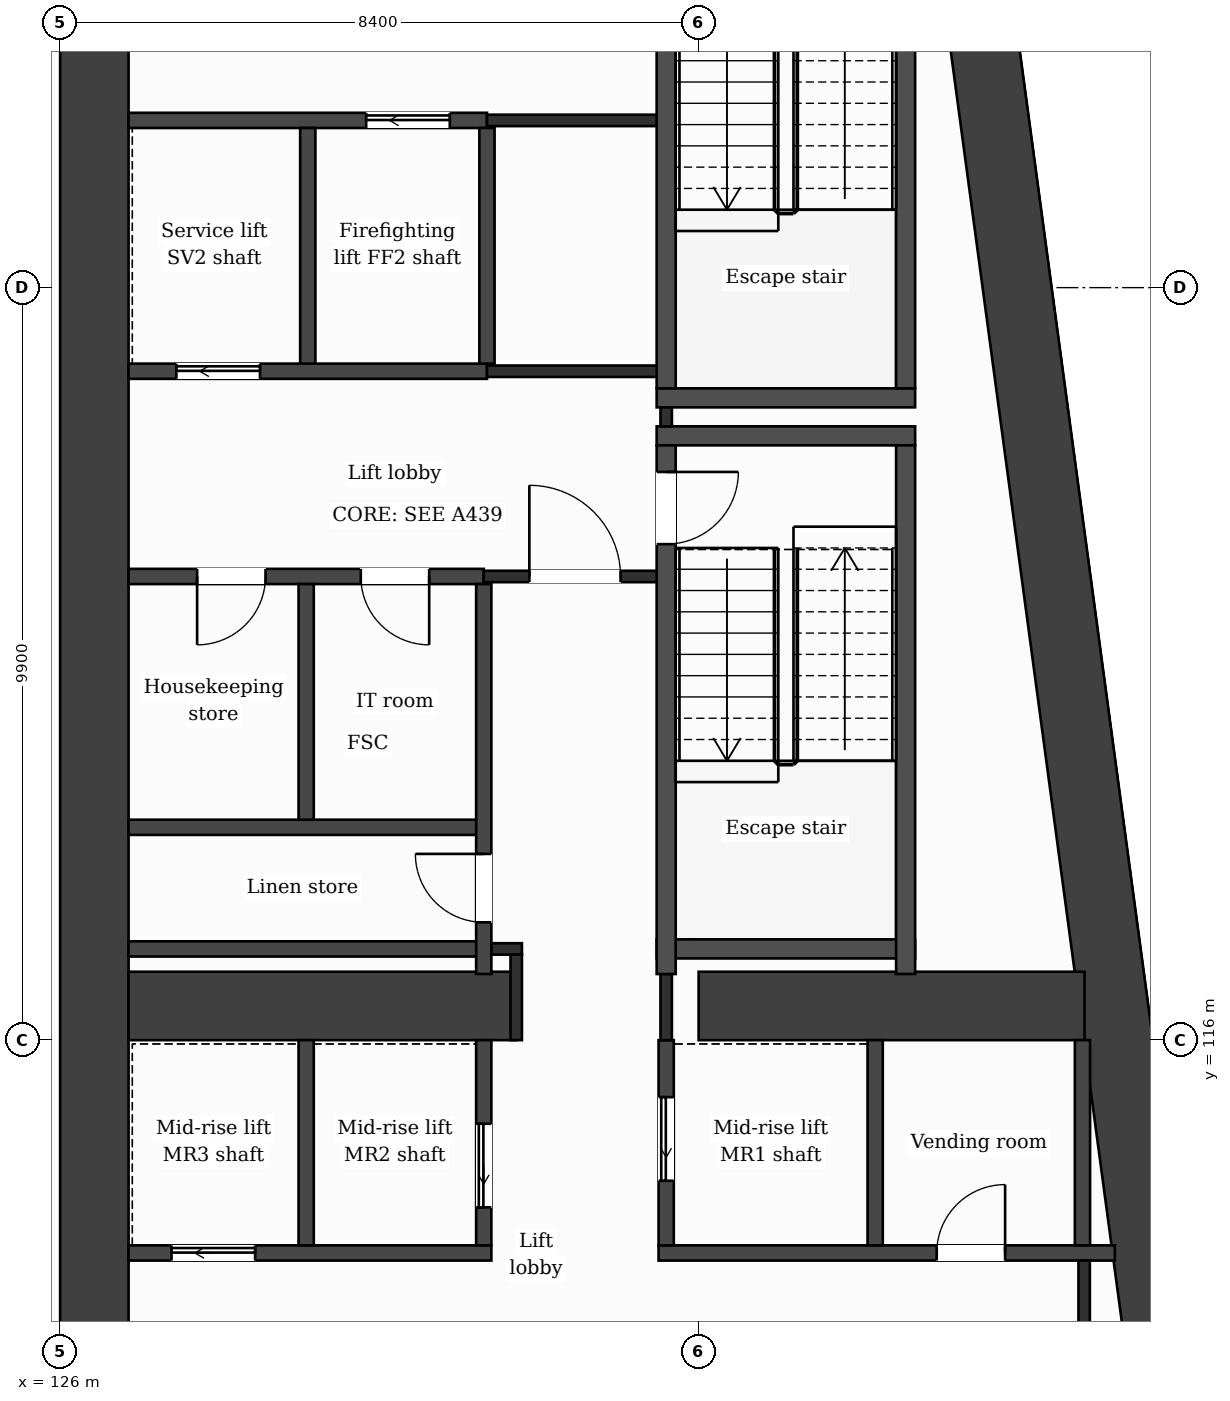
"""IFC4 building model, lengths in metres.
Left out: names, types, materials, properties, quantities, classifications, styles, units other than length and angle.
Written with IfcOpenShell. Run it as: python <this file> out.ifc"""

import sys

from ifc_helpers import new_model, si_unit, direction, frame, frame_2d, origin, place, context, subcontext, project, spatial, rectangle, extrude, element, fill, save


model = new_model("IFC4")
c1 = context("Model", 3, precision=1e-05, world=origin(), true_north=direction((0.0, 1.0)))
c2 = subcontext(c1, "Body", "Model", "MODEL_VIEW")
j1 = project(units=[si_unit("LENGTHUNIT", "METRE"), si_unit("PLANEANGLEUNIT", "RADIAN")], contexts=[c1])
p1 = place(None, origin())
s1 = spatial("IfcSite", under=j1, at=p1, CompositionType="ELEMENT")
p2 = place(p1, origin())
s2 = spatial("IfcBuilding", under=s1, at=p2, CompositionType="ELEMENT")
p3 = place(p2, frame((0.0, 0.0, 162.6)))
s3 = spatial("IfcBuildingStorey", under=s2, at=p3, CompositionType="ELEMENT", Elevation=162.6)
p4 = place(p3, frame((137.776, 131.95, 0.0), z_axis=(0.0, 0.0, 1.0), x_axis=(0.133421759112, -0.991059349482, 0.0)))
e1 = element("IfcWall", 1, at=p4, inside=s3, PredefinedType="SHEAR", context=c2, shape_type="SweptSolid", body=[
    extrude(rectangle(XDim=21.29, YDim=0.9, at=frame_2d((10.645, 0.0))), origin(), (0.0, 0.0, 1.0), 3.7),
])
p5 = place(p3, frame((126.45, 110.85, 0.0), z_axis=(0.0, 0.0, 1.0), x_axis=(0.0, 1.0, 0.0)))
e2 = element("IfcWall", 2, at=p5, inside=s3, PredefinedType="SHEAR", context=c2, shape_type="SweptSolid", body=[
    extrude(rectangle(XDim=21.1, YDim=0.9, at=frame_2d((10.55, 0.0))), origin(), (0.0, 0.0, 1.0), 3.7),
])
p6 = place(p3, frame((126.9, 116.45, 0.0), z_axis=(0.0, 0.0, 1.0), x_axis=(1.0, 0.0, 0.0)))
e3 = element("IfcWall", 3, at=p6, inside=s3, PredefinedType="SHEAR", context=c2, shape_type="SweptSolid", body=[
    extrude(rectangle(XDim=5.1, YDim=0.9, at=frame_2d((2.55, 0.0))), origin(), (0.0, 0.0, 1.0), 3.7),
])
p7 = place(p3, frame((134.4, 116.45, 0.0), z_axis=(0.0, 0.0, 1.0), x_axis=(1.0, 0.0, 0.0)))
e4 = element("IfcWall", 4, at=p7, inside=s3, PredefinedType="SHEAR", context=c2, shape_type="SweptSolid", body=[
    extrude(rectangle(XDim=5.077, YDim=0.9, at=frame_2d((2.539, 0.0))), origin(), (0.0, 0.0, 1.0), 3.7),
])
p8 = place(p3, frame((126.9, 113.2, 0.0), z_axis=(0.0, 0.0, 1.0), x_axis=(1.0, 0.0, 0.0)))
e5 = element("IfcWall", 5, at=p8, inside=s3, PredefinedType="PARTITIONING", context=c2, shape_type="SweptSolid", body=[
    extrude(rectangle(XDim=4.773, YDim=0.2, at=frame_2d((2.387, 0.0))), origin(), (0.0, 0.0, 1.0), 3.38),
])
p9 = place(p8, frame((0.565, 0.0, 0.0)))
e6 = element("IfcOpeningElement", 6, at=p9, cuts=e5, PredefinedType="OPENING", context=c2, shape_type="SweptSolid", body=[
    extrude(rectangle(XDim=1.1, YDim=2.1, at=frame_2d((0.55, 1.05))), frame((0.0, 0.11, 0.0), z_axis=(0.0, -1.0, 0.0), x_axis=(1.0, 0.0, 0.0)), (0.0, 0.0, 1.0), 0.22),
])
p10 = place(p3, frame((133.873, 113.2, 0.0), z_axis=(0.0, 0.0, 1.0), x_axis=(1.0, 0.0, 0.0)))
e7 = element("IfcWall", 7, at=p10, inside=s3, PredefinedType="PARTITIONING", context=c2, shape_type="SweptSolid", body=[
    extrude(rectangle(XDim=6.003, YDim=0.2, at=frame_2d((3.001, 0.0))), origin(), (0.0, 0.0, 1.0), 3.38),
])
p11 = place(p10, frame((3.659, 0.0, 0.0)))
e8 = element("IfcOpeningElement", 8, at=p11, cuts=e7, PredefinedType="OPENING", context=c2, shape_type="SweptSolid", body=[
    extrude(rectangle(XDim=0.9, YDim=2.1, at=frame_2d((0.45, 1.05))), frame((0.0, 0.11, 0.0), z_axis=(0.0, -1.0, 0.0), x_axis=(1.0, 0.0, 0.0)), (0.0, 0.0, 1.0), 0.22),
])
p12 = place(p3, frame((126.9, 117.2, 0.0), z_axis=(0.0, 0.0, 1.0), x_axis=(1.0, 0.0, 0.0)))
e9 = element("IfcWall", 9, at=p12, inside=s3, PredefinedType="PARTITIONING", context=c2, shape_type="SweptSolid", body=[
    extrude(rectangle(XDim=4.673, YDim=0.2, at=frame_2d((2.336, 0.0))), origin(), (0.0, 0.0, 1.0), 3.38),
])
p13 = place(p3, frame((131.573, 117.2, 0.0), z_axis=(0.0, 0.0, 1.0), x_axis=(1.0, 0.0, 0.0)))
e10 = element("IfcWall", 10, at=p13, inside=s3, PredefinedType="PARTITIONING", context=c2, shape_type="SweptSolid", body=[
    extrude(rectangle(XDim=0.502, YDim=0.15, at=frame_2d((0.251, 0.0))), origin(), (0.0, 0.0, 1.0), 3.38),
])
p14 = place(p3, frame((133.848, 117.2, 0.0), z_axis=(0.0, 0.0, 1.0), x_axis=(1.0, 0.0, 0.0)))
e11 = element("IfcWall", 11, at=p14, inside=s3, PredefinedType="PARTITIONING", context=c2, shape_type="SweptSolid", body=[
    extrude(rectangle(XDim=3.4, YDim=0.25, at=frame_2d((1.7, 0.0))), origin(), (0.0, 0.0, 1.0), 3.38),
])
p15 = place(p3, frame((126.9, 118.8, 0.0), z_axis=(0.0, 0.0, 1.0), x_axis=(1.0, 0.0, 0.0)))
e12 = element("IfcWall", 12, at=p15, inside=s3, PredefinedType="PARTITIONING", context=c2, shape_type="SweptSolid", body=[
    extrude(rectangle(XDim=4.673, YDim=0.2, at=frame_2d((2.336, 0.0))), origin(), (0.0, 0.0, 1.0), 3.38),
])
p16 = place(p3, frame((126.9, 122.1, 0.0), z_axis=(0.0, 0.0, 1.0), x_axis=(1.0, 0.0, 0.0)))
e13 = element("IfcWall", 13, at=p16, inside=s3, PredefinedType="PARTITIONING", context=c2, shape_type="SweptSolid", body=[
    extrude(rectangle(XDim=4.673, YDim=0.2, at=frame_2d((2.336, 0.0))), origin(), (0.0, 0.0, 1.0), 3.38),
])
p17 = place(p16, frame((3.055, 0.0, 0.0)))
e14 = element("IfcOpeningElement", 14, at=p17, cuts=e13, PredefinedType="OPENING", context=c2, shape_type="SweptSolid", body=[
    extrude(rectangle(XDim=0.9, YDim=2.1, at=frame_2d((0.45, 1.05))), frame((0.0, 0.11, 0.0), z_axis=(0.0, -1.0, 0.0), x_axis=(1.0, 0.0, 0.0)), (0.0, 0.0, 1.0), 0.22),
])
p18 = place(p16, frame((0.902, 0.0, 0.0)))
e15 = element("IfcOpeningElement", 15, at=p18, cuts=e13, PredefinedType="OPENING", context=c2, shape_type="SweptSolid", body=[
    extrude(rectangle(XDim=0.9, YDim=2.1, at=frame_2d((0.45, 1.05))), frame((0.0, 0.11, 0.0), z_axis=(0.0, -1.0, 0.0), x_axis=(1.0, 0.0, 0.0)), (0.0, 0.0, 1.0), 0.22),
])
p19 = place(p3, frame((131.573, 122.1, 0.0), z_axis=(0.0, 0.0, 1.0), x_axis=(1.0, 0.0, 0.0)))
e16 = element("IfcWall", 16, at=p19, inside=s3, PredefinedType="PARTITIONING", context=c2, shape_type="SweptSolid", body=[
    extrude(rectangle(XDim=2.4, YDim=0.15, at=frame_2d((1.2, 0.0))), origin(), (0.0, 0.0, 1.0), 3.38),
])
p20 = place(p19, frame((0.6, 0.0, 0.0)))
e17 = element("IfcOpeningElement", 17, at=p20, cuts=e16, PredefinedType="OPENING", context=c2, shape_type="SweptSolid", body=[
    extrude(rectangle(XDim=1.2, YDim=2.1, at=frame_2d((0.6, 1.05))), frame((0.0, 0.085, 0.0), z_axis=(0.0, -1.0, 0.0), x_axis=(1.0, 0.0, 0.0)), (0.0, 0.0, 1.0), 0.17),
])
for number, where, z_axis, x_axis in (
    (18, (133.848, 123.95, 0.0), (0.0, 0.0, 1.0), (1.0, 0.0, 0.0)),
    (19, (133.848, 124.45, 0.0), (0.0, 0.0, 1.0), (1.0, 0.0, 0.0)),
):
    element("IfcWall", number, at=place(p3, frame(where, z_axis=z_axis, x_axis=x_axis)), inside=s3, PredefinedType="PARTITIONING", context=c2, shape_type="SweptSolid", body=[
        extrude(rectangle(XDim=3.4, YDim=0.25, at=frame_2d((1.7, 0.0))), origin(), (0.0, 0.0, 1.0), 3.38),
    ])
p21 = place(p3, frame((126.9, 124.8, 0.0), z_axis=(0.0, 0.0, 1.0), x_axis=(1.0, 0.0, 0.0)))
e20 = element("IfcWall", 20, at=p21, inside=s3, PredefinedType="PARTITIONING", context=c2, shape_type="SweptSolid", body=[
    extrude(rectangle(XDim=4.715, YDim=0.2, at=frame_2d((2.358, 0.0))), origin(), (0.0, 0.0, 1.0), 3.38),
])
p22 = place(p21, frame((0.629, 0.0, 0.0)))
e21 = element("IfcOpeningElement", 21, at=p22, cuts=e20, PredefinedType="OPENING", context=c2, shape_type="SweptSolid", body=[
    extrude(rectangle(XDim=1.1, YDim=2.1, at=frame_2d((0.55, 1.05))), frame((0.0, 0.11, 0.0), z_axis=(0.0, -1.0, 0.0), x_axis=(1.0, 0.0, 0.0)), (0.0, 0.0, 1.0), 0.22),
])
p23 = place(p3, frame((131.615, 124.8, 0.0), z_axis=(0.0, 0.0, 1.0), x_axis=(1.0, 0.0, 0.0)))
e22 = element("IfcWall", 22, at=p23, inside=s3, PredefinedType="PARTITIONING", context=c2, shape_type="SweptSolid", body=[
    extrude(rectangle(XDim=2.483, YDim=0.15, at=frame_2d((1.241, 0.0))), origin(), (0.0, 0.0, 1.0), 3.38),
])
p24 = place(p3, frame((126.9, 128.1, 0.0), z_axis=(0.0, 0.0, 1.0), x_axis=(1.0, 0.0, 0.0)))
e23 = element("IfcWall", 23, at=p24, inside=s3, PredefinedType="PARTITIONING", context=c2, shape_type="SweptSolid", body=[
    extrude(rectangle(XDim=4.715, YDim=0.2, at=frame_2d((2.358, 0.0))), origin(), (0.0, 0.0, 1.0), 3.38),
])
p25 = place(p24, frame((3.126, 0.0, 0.0)))
e24 = element("IfcOpeningElement", 24, at=p25, cuts=e23, PredefinedType="OPENING", context=c2, shape_type="SweptSolid", body=[
    extrude(rectangle(XDim=1.1, YDim=2.1, at=frame_2d((0.55, 1.05))), frame((0.0, 0.11, 0.0), z_axis=(0.0, -1.0, 0.0), x_axis=(1.0, 0.0, 0.0)), (0.0, 0.0, 1.0), 0.22),
])
p26 = place(p3, frame((131.615, 128.1, 0.0), z_axis=(0.0, 0.0, 1.0), x_axis=(1.0, 0.0, 0.0)))
e25 = element("IfcWall", 25, at=p26, inside=s3, PredefinedType="PARTITIONING", context=c2, shape_type="SweptSolid", body=[
    extrude(rectangle(XDim=2.358, YDim=0.15, at=frame_2d((1.179, 0.0))), origin(), (0.0, 0.0, 1.0), 3.38),
])
p27 = place(p3, frame((129.237, 113.3, 0.0), z_axis=(0.0, 0.0, 1.0), x_axis=(0.0, 1.0, 0.0)))
e26 = element("IfcWall", 26, at=p27, inside=s3, PredefinedType="PARTITIONING", context=c2, shape_type="SweptSolid", body=[
    extrude(rectangle(XDim=2.7, YDim=0.2, at=frame_2d((1.35, 0.0))), origin(), (0.0, 0.0, 1.0), 3.38),
])
for number, where, z_axis, x_axis in (
    (27, (129.237, 118.9, 0.0), (0.0, 0.0, 1.0), (0.0, 1.0, 0.0)),
    (28, (129.258, 124.9, 0.0), (0.0, 0.0, 1.0), (0.0, 1.0, 0.0)),
):
    element("IfcWall", number, at=place(p3, frame(where, z_axis=z_axis, x_axis=x_axis)), inside=s3, PredefinedType="PARTITIONING", context=c2, shape_type="SweptSolid", body=[
        extrude(rectangle(XDim=3.1, YDim=0.2, at=frame_2d((1.55, 0.0))), origin(), (0.0, 0.0, 1.0), 3.38),
    ])
p28 = place(p3, frame((131.573, 113.3, 0.0), z_axis=(0.0, 0.0, 1.0), x_axis=(0.0, 1.0, 0.0)))
e29 = element("IfcWall", 29, at=p28, inside=s3, PredefinedType="PARTITIONING", context=c2, shape_type="SweptSolid", body=[
    extrude(rectangle(XDim=2.7, YDim=0.2, at=frame_2d((1.35, 0.0))), origin(), (0.0, 0.0, 1.0), 3.38),
])
p29 = place(p28, frame((0.5, 0.0, 0.0)))
e30 = element("IfcOpeningElement", 30, at=p29, cuts=e29, PredefinedType="OPENING", context=c2, shape_type="SweptSolid", body=[
    extrude(rectangle(XDim=1.1, YDim=2.1, at=frame_2d((0.55, 1.05))), frame((0.0, 0.11, 0.0), z_axis=(0.0, -1.0, 0.0), x_axis=(1.0, 0.0, 0.0)), (0.0, 0.0, 1.0), 0.22),
])
p30 = place(p3, frame((131.573, 116.87, 0.0), z_axis=(0.0, 0.0, 1.0), x_axis=(0.0, 1.0, 0.0)))
e31 = element("IfcWall", 31, at=p30, inside=s3, PredefinedType="PARTITIONING", context=c2, shape_type="SweptSolid", body=[
    extrude(rectangle(XDim=5.13, YDim=0.2, at=frame_2d((2.565, 0.0))), origin(), (0.0, 0.0, 1.0), 3.38),
])
p31 = place(p30, frame((0.68, 0.0, 0.0)))
e32 = element("IfcOpeningElement", 32, at=p31, cuts=e31, PredefinedType="OPENING", context=c2, shape_type="SweptSolid", body=[
    extrude(rectangle(XDim=0.9, YDim=2.1, at=frame_2d((0.45, 1.05))), frame((0.0, 0.11, 0.0), z_axis=(0.0, -1.0, 0.0), x_axis=(1.0, 0.0, 0.0)), (0.0, 0.0, 1.0), 0.22),
])
p32 = place(p3, frame((131.615, 124.9, 0.0), z_axis=(0.0, 0.0, 1.0), x_axis=(0.0, 1.0, 0.0)))
e33 = element("IfcWall", 33, at=p32, inside=s3, PredefinedType="PARTITIONING", context=c2, shape_type="SweptSolid", body=[
    extrude(rectangle(XDim=3.1, YDim=0.2, at=frame_2d((1.55, 0.0))), origin(), (0.0, 0.0, 1.0), 3.38),
])
p33 = place(p3, frame((132.0, 116.0, 0.0), z_axis=(0.0, 0.0, 1.0), x_axis=(0.0, 1.0, 0.0)))
e34 = element("IfcWall", 34, at=p33, inside=s3, PredefinedType="PARTITIONING", context=c2, shape_type="SweptSolid", body=[
    extrude(rectangle(XDim=1.125, YDim=0.15, at=frame_2d((0.562, 0.0))), origin(), (0.0, 0.0, 1.0), 3.38),
])
p34 = place(p3, frame((133.973, 113.3, 0.0), z_axis=(0.0, 0.0, 1.0), x_axis=(0.0, 1.0, 0.0)))
e35 = element("IfcWall", 35, at=p34, inside=s3, PredefinedType="PARTITIONING", context=c2, shape_type="SweptSolid", body=[
    extrude(rectangle(XDim=2.7, YDim=0.2, at=frame_2d((1.35, 0.0))), origin(), (0.0, 0.0, 1.0), 3.38),
])
p35 = place(p34, frame((0.85, 0.0, 0.0)))
e36 = element("IfcOpeningElement", 36, at=p35, cuts=e35, PredefinedType="OPENING", context=c2, shape_type="SweptSolid", body=[
    extrude(rectangle(XDim=1.1, YDim=2.1, at=frame_2d((0.55, 1.05))), frame((0.0, 0.11, 0.0), z_axis=(0.0, -1.0, 0.0), x_axis=(1.0, 0.0, 0.0)), (0.0, 0.0, 1.0), 0.22),
])
p36 = place(p3, frame((133.973, 116.0, 0.0), z_axis=(0.0, 0.0, 1.0), x_axis=(0.0, 1.0, 0.0)))
e37 = element("IfcWall", 37, at=p36, inside=s3, PredefinedType="PARTITIONING", context=c2, shape_type="SweptSolid", body=[
    extrude(rectangle(XDim=0.87, YDim=0.15, at=frame_2d((0.435, 0.0))), origin(), (0.0, 0.0, 1.0), 3.38),
])
p37 = place(p3, frame((133.973, 124.075, 0.0), z_axis=(0.0, 0.0, 1.0), x_axis=(0.0, 1.0, 0.0)))
e38 = element("IfcWall", 38, at=p37, inside=s3, PredefinedType="PARTITIONING", context=c2, shape_type="SweptSolid", body=[
    extrude(rectangle(XDim=0.25, YDim=0.15, at=frame_2d((0.125, 0.0))), origin(), (0.0, 0.0, 1.0), 3.38),
])
p38 = place(p3, frame((133.973, 116.87, 0.0), z_axis=(0.0, 0.0, 1.0), x_axis=(0.0, 1.0, 0.0)))
e39 = element("IfcWall", 39, at=p38, inside=s3, PredefinedType="PARTITIONING", context=c2, shape_type="SweptSolid", body=[
    extrude(rectangle(XDim=6.955, YDim=0.25, at=frame_2d((3.478, 0.0))), origin(), (0.0, 0.0, 1.0), 3.38),
])
p39 = place(p38, frame((5.655, 0.0, 0.0)))
e40 = element("IfcOpeningElement", 40, at=p39, cuts=e39, PredefinedType="OPENING", context=c2, shape_type="SweptSolid", body=[
    extrude(rectangle(XDim=0.95, YDim=2.1, at=frame_2d((0.475, 1.05))), frame((0.0, 0.135, 0.0), z_axis=(0.0, -1.0, 0.0), x_axis=(1.0, 0.0, 0.0)), (0.0, 0.0, 1.0), 0.27),
])
p40 = place(p3, frame((133.973, 124.575, 0.0), z_axis=(0.0, 0.0, 1.0), x_axis=(0.0, 1.0, 0.0)))
e41 = element("IfcWall", 41, at=p40, inside=s3, PredefinedType="PARTITIONING", context=c2, shape_type="SweptSolid", body=[
    extrude(rectangle(XDim=6.955, YDim=0.25, at=frame_2d((3.478, 0.0))), origin(), (0.0, 0.0, 1.0), 3.38),
])
p41 = place(p40, frame((5.325, 0.0, 0.0)))
e42 = element("IfcOpeningElement", 42, at=p41, cuts=e41, PredefinedType="OPENING", context=c2, shape_type="SweptSolid", body=[
    extrude(rectangle(XDim=1.0, YDim=2.1, at=frame_2d((0.5, 1.05))), frame((0.0, 0.135, 0.0), z_axis=(0.0, -1.0, 0.0), x_axis=(1.0, 0.0, 0.0)), (0.0, 0.0, 1.0), 0.27),
])
p42 = place(p3, frame((136.722, 113.3, 0.0), z_axis=(0.0, 0.0, 1.0), x_axis=(0.0, 1.0, 0.0)))
e43 = element("IfcWall", 43, at=p42, inside=s3, PredefinedType="PARTITIONING", context=c2, shape_type="SweptSolid", body=[
    extrude(rectangle(XDim=2.7, YDim=0.2, at=frame_2d((1.35, 0.0))), origin(), (0.0, 0.0, 1.0), 3.38),
])
p43 = place(p3, frame((137.123, 116.87, 0.0), z_axis=(0.0, 0.0, 1.0), x_axis=(0.0, 1.0, 0.0)))
e44 = element("IfcWall", 44, at=p43, inside=s3, PredefinedType="PARTITIONING", context=c2, shape_type="SweptSolid", body=[
    extrude(rectangle(XDim=6.955, YDim=0.25, at=frame_2d((3.478, 0.0))), origin(), (0.0, 0.0, 1.0), 3.38),
])
p44 = place(p3, frame((137.123, 124.575, 0.0), z_axis=(0.0, 0.0, 1.0), x_axis=(0.0, 1.0, 0.0)))
e45 = element("IfcWall", 45, at=p44, inside=s3, PredefinedType="PARTITIONING", context=c2, shape_type="SweptSolid", body=[
    extrude(rectangle(XDim=6.955, YDim=0.25, at=frame_2d((3.478, 0.0))), origin(), (0.0, 0.0, 1.0), 3.38),
])
p45 = place(p3, frame((139.45, 113.3, 0.0), z_axis=(0.0, 0.0, 1.0), x_axis=(0.0, 1.0, 0.0)))
e46 = element("IfcWall", 46, at=p45, inside=s3, PredefinedType="PARTITIONING", context=c2, shape_type="SweptSolid", body=[
    extrude(rectangle(XDim=2.7, YDim=0.2, at=frame_2d((1.35, 0.0))), origin(), (0.0, 0.0, 1.0), 3.38),
])
p46 = place(p3, frame((139.472, 111.3, 0.0), z_axis=(0.0, 0.0, 1.0), x_axis=(0.0, 1.0, 0.0)))
e47 = element("IfcWall", 47, at=p46, inside=s3, PredefinedType="PARTITIONING", context=c2, shape_type="SweptSolid", body=[
    extrude(rectangle(XDim=1.8, YDim=0.15, at=frame_2d((0.9, 0.0))), origin(), (0.0, 0.0, 1.0), 3.38),
])
p47 = place(p20, origin())
e48 = element("IfcDoor", 48, at=p47, inside=s3, OperationType="SINGLE_SWING_LEFT", PredefinedType="DOOR", context=c2, shape_type="SweptSolid", body=[
    extrude(rectangle(XDim=1.2, YDim=2.1, at=frame_2d((0.6, 1.05))), frame((0.0, 0.025, 0.0), z_axis=(0.0, -1.0, 0.0), x_axis=(1.0, 0.0, 0.0)), (0.0, 0.0, 1.0), 0.05),
])
fill(e17, e48)
p48 = place(p25, origin())
e49 = element("IfcDoor", 49, at=p48, inside=s3, OperationType="SLIDING_TO_LEFT", PredefinedType="DOOR", context=c2, shape_type="SweptSolid", body=[
    extrude(rectangle(XDim=1.1, YDim=2.1, at=frame_2d((0.55, 1.05))), frame((0.0, 0.025, 0.0), z_axis=(0.0, -1.0, 0.0), x_axis=(1.0, 0.0, 0.0)), (0.0, 0.0, 1.0), 0.05),
])
fill(e24, e49)
p49 = place(p22, origin())
e50 = element("IfcDoor", 50, at=p49, inside=s3, OperationType="SLIDING_TO_LEFT", PredefinedType="DOOR", context=c2, shape_type="SweptSolid", body=[
    extrude(rectangle(XDim=1.1, YDim=2.1, at=frame_2d((0.55, 1.05))), frame((0.0, 0.025, 0.0), z_axis=(0.0, -1.0, 0.0), x_axis=(1.0, 0.0, 0.0)), (0.0, 0.0, 1.0), 0.05),
])
fill(e21, e50)
p50 = place(p17, origin())
e51 = element("IfcDoor", 51, at=p50, inside=s3, OperationType="SINGLE_SWING_RIGHT", PredefinedType="DOOR", context=c2, shape_type="SweptSolid", body=[
    extrude(rectangle(XDim=0.9, YDim=2.1, at=frame_2d((0.45, 1.05))), frame((0.0, 0.025, 0.0), z_axis=(0.0, -1.0, 0.0), x_axis=(1.0, 0.0, 0.0)), (0.0, 0.0, 1.0), 0.05),
])
fill(e14, e51)
p51 = place(p18, origin())
e52 = element("IfcDoor", 52, at=p51, inside=s3, OperationType="SINGLE_SWING_LEFT", PredefinedType="DOOR", context=c2, shape_type="SweptSolid", body=[
    extrude(rectangle(XDim=0.9, YDim=2.1, at=frame_2d((0.45, 1.05))), frame((0.0, 0.025, 0.0), z_axis=(0.0, -1.0, 0.0), x_axis=(1.0, 0.0, 0.0)), (0.0, 0.0, 1.0), 0.05),
])
fill(e15, e52)
p52 = place(p39, origin())
e53 = element("IfcDoor", 53, at=p52, inside=s3, OperationType="SINGLE_SWING_RIGHT", PredefinedType="DOOR", context=c2, shape_type="SweptSolid", body=[
    extrude(rectangle(XDim=0.95, YDim=2.1, at=frame_2d((0.475, 1.05))), frame((0.0, 0.025, 0.0), z_axis=(0.0, -1.0, 0.0), x_axis=(1.0, 0.0, 0.0)), (0.0, 0.0, 1.0), 0.05),
])
fill(e40, e53)
p53 = place(p31, origin())
e54 = element("IfcDoor", 54, at=p53, inside=s3, OperationType="SINGLE_SWING_RIGHT", PredefinedType="DOOR", context=c2, shape_type="SweptSolid", body=[
    extrude(rectangle(XDim=0.9, YDim=2.1, at=frame_2d((0.45, 1.05))), frame((0.0, 0.025, 0.0), z_axis=(0.0, -1.0, 0.0), x_axis=(1.0, 0.0, 0.0)), (0.0, 0.0, 1.0), 0.05),
])
fill(e32, e54)
p54 = place(p35, origin())
e55 = element("IfcDoor", 55, at=p54, inside=s3, OperationType="SLIDING_TO_LEFT", PredefinedType="DOOR", context=c2, shape_type="SweptSolid", body=[
    extrude(rectangle(XDim=1.1, YDim=2.1, at=frame_2d((0.55, 1.05))), frame((0.0, 0.025, 0.0), z_axis=(0.0, -1.0, 0.0), x_axis=(1.0, 0.0, 0.0)), (0.0, 0.0, 1.0), 0.05),
])
fill(e36, e55)
p55 = place(p29, origin())
e56 = element("IfcDoor", 56, at=p55, inside=s3, OperationType="SLIDING_TO_LEFT", PredefinedType="DOOR", context=c2, shape_type="SweptSolid", body=[
    extrude(rectangle(XDim=1.1, YDim=2.1, at=frame_2d((0.55, 1.05))), frame((0.0, 0.025, 0.0), z_axis=(0.0, -1.0, 0.0), x_axis=(1.0, 0.0, 0.0)), (0.0, 0.0, 1.0), 0.05),
])
fill(e30, e56)
p56 = place(p9, origin())
e57 = element("IfcDoor", 57, at=p56, inside=s3, OperationType="SLIDING_TO_LEFT", PredefinedType="DOOR", context=c2, shape_type="SweptSolid", body=[
    extrude(rectangle(XDim=1.1, YDim=2.1, at=frame_2d((0.55, 1.05))), frame((0.0, 0.025, 0.0), z_axis=(0.0, -1.0, 0.0), x_axis=(1.0, 0.0, 0.0)), (0.0, 0.0, 1.0), 0.05),
])
fill(e6, e57)
p57 = place(p11, origin())
e58 = element("IfcDoor", 58, at=p57, inside=s3, OperationType="SINGLE_SWING_RIGHT", PredefinedType="DOOR", context=c2, shape_type="SweptSolid", body=[
    extrude(rectangle(XDim=0.9, YDim=2.1, at=frame_2d((0.45, 1.05))), frame((0.0, 0.025, 0.0), z_axis=(0.0, -1.0, 0.0), x_axis=(1.0, 0.0, 0.0)), (0.0, 0.0, 1.0), 0.05),
])
fill(e8, e58)
save(model, sys.argv[1])
